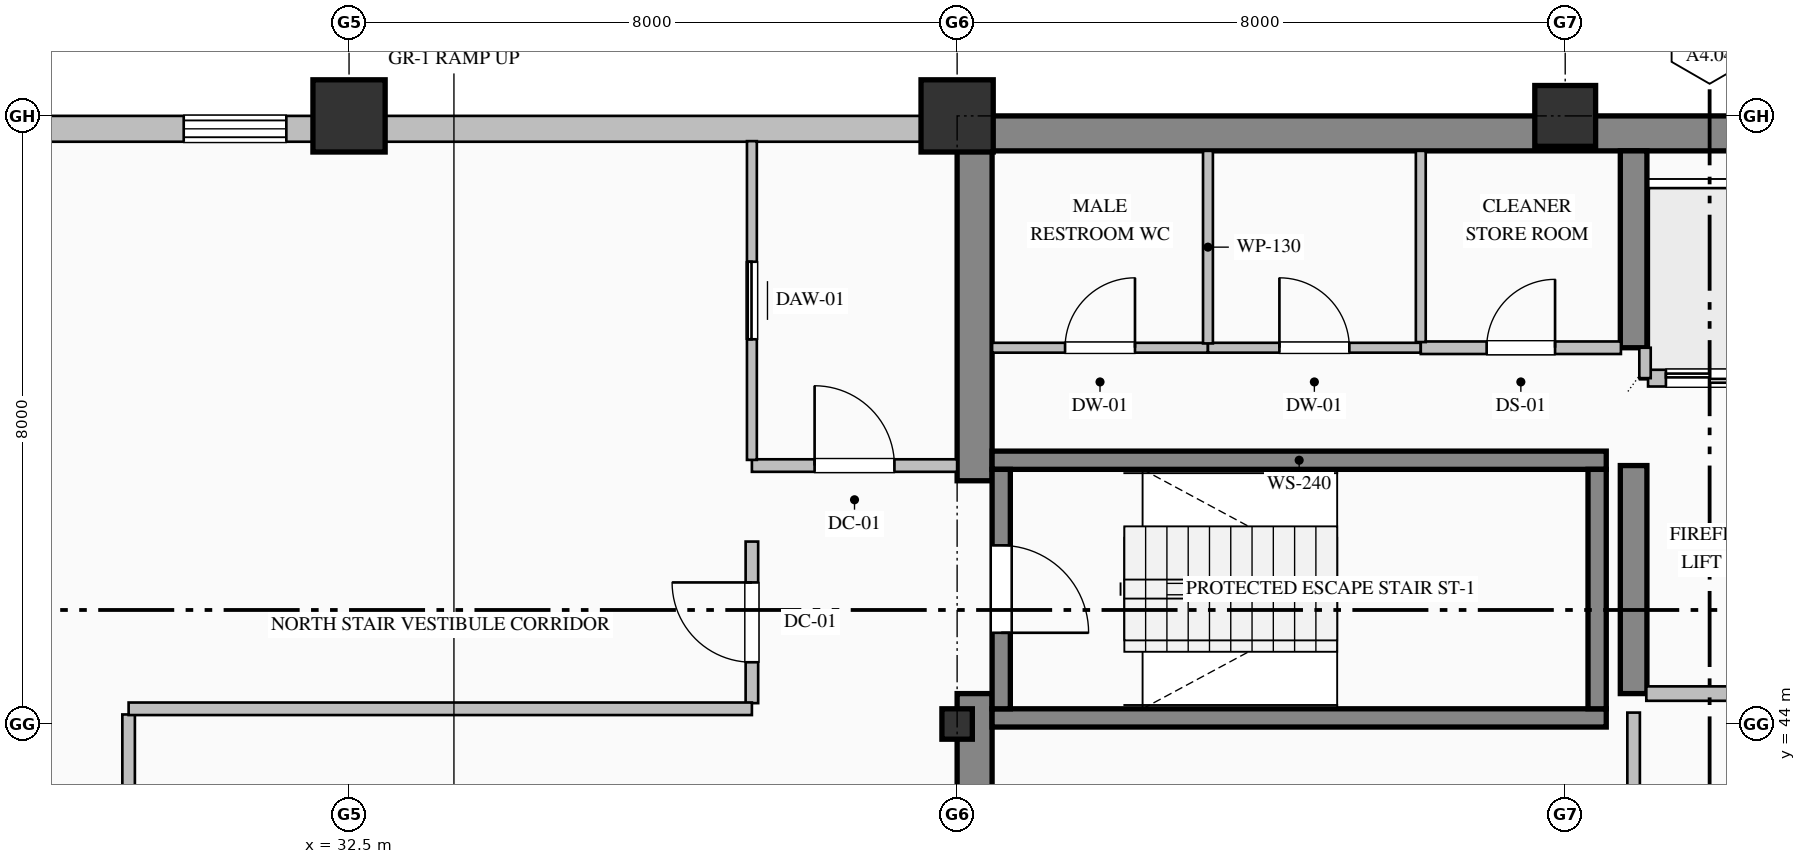
"""IFC4 building model, lengths in metres.
Left out: names, types, materials, properties, quantities, classifications, styles, units other than length and angle.
Written with IfcOpenShell. Run it as: python <this file> out.ifc"""

import sys

from ifc_helpers import new_model, si_unit, direction, frame, frame_2d, origin, origin_2d, place, context, subcontext, project, spatial, rectangle, hollow_rectangle, i_section, extrude, element, fill, save


model = new_model("IFC4")
c1 = context("Model", 3, precision=1e-05, world=origin(), true_north=direction((0.0, 1.0)))
c2 = subcontext(c1, "Body", "Model", "MODEL_VIEW")
j1 = project(units=[si_unit("LENGTHUNIT", "METRE"), si_unit("PLANEANGLEUNIT", "RADIAN")], contexts=[c1])
p1 = place(None, origin())
s1 = spatial("IfcSite", under=j1, at=p1, CompositionType="ELEMENT")
p2 = place(p1, origin())
s2 = spatial("IfcBuilding", under=s1, at=p2, CompositionType="ELEMENT")
p3 = place(p2, frame((0.0, 0.0, 205.8)))
s3 = spatial("IfcBuildingStorey", under=s2, at=p3, CompositionType="ELEMENT", Elevation=205.8)
p4 = place(p3, frame((40.5, 51.77, 0.0), z_axis=(0.0, 0.0, 1.0), x_axis=(1.0, 0.0, 0.0)))
e1 = element("IfcWall", 1, at=p4, inside=s3, PredefinedType="SHEAR", context=c2, shape_type="SweptSolid", body=[
    extrude(rectangle(XDim=23.5, YDim=0.46, at=frame_2d((11.75, 0.0))), origin(), (0.0, 0.0, 1.0), 3.775),
])
p5 = place(p3, frame((40.73, 36.46, 0.0), z_axis=(0.0, 0.0, 1.0), x_axis=(0.0, 1.0, 0.0)))
e2 = element("IfcWall", 2, at=p5, inside=s3, PredefinedType="SHEAR", context=c2, shape_type="SweptSolid", body=[
    extrude(rectangle(XDim=7.94, YDim=0.46, at=frame_2d((3.97, 0.0))), origin(), (0.0, 0.0, 1.0), 3.775),
])
p6 = place(p3, frame((40.73, 47.2, 0.0), z_axis=(0.0, 0.0, 1.0), x_axis=(0.0, 1.0, 0.0)))
e3 = element("IfcWall", 3, at=p6, inside=s3, PredefinedType="SHEAR", context=c2, shape_type="SweptSolid", body=[
    extrude(rectangle(XDim=4.34, YDim=0.46, at=frame_2d((2.17, 0.0))), origin(), (0.0, 0.0, 1.0), 3.775),
])
p7 = place(p3, frame((49.4, 44.4, 0.0), z_axis=(0.0, 0.0, 1.0), x_axis=(0.0, 1.0, 0.0)))
e4 = element("IfcWall", 4, at=p7, inside=s3, PredefinedType="SHEAR", context=c2, shape_type="SweptSolid", body=[
    extrude(rectangle(XDim=3.0, YDim=0.35, at=frame_2d((1.5, 0.0))), origin(), (0.0, 0.0, 1.0), 3.775),
])
p8 = place(p3, frame((49.4, 48.95, 0.0), z_axis=(0.0, 0.0, 1.0), x_axis=(0.0, 1.0, 0.0)))
e5 = element("IfcWall", 5, at=p8, inside=s3, PredefinedType="SHEAR", context=c2, shape_type="SweptSolid", body=[
    extrude(rectangle(XDim=2.59, YDim=0.35, at=frame_2d((1.295, 0.0))), origin(), (0.0, 0.0, 1.0), 3.775),
])
p9 = place(p3, frame((32.5, 52.0, 0.0), z_axis=(0.0, 0.0, 1.0), x_axis=(1.0, 0.0, 0.0)))
e6 = element("IfcColumn", 6, at=p9, inside=s3, PredefinedType="COLUMN", context=c2, shape_type="SweptSolid", body=[
    extrude(hollow_rectangle(XDim=0.95, YDim=0.95, WallThickness=0.036, at=origin_2d()), origin(), (0.0, 0.0, 1.0), 4.0),
])
p10 = place(p3, frame((40.5, 44.0, 0.0), z_axis=(0.0, 0.0, 1.0), x_axis=(1.0, 0.0, 0.0)))
e7 = element("IfcColumn", 7, at=p10, inside=s3, PredefinedType="COLUMN", context=c2, shape_type="SweptSolid", body=[
    extrude(i_section(OverallWidth=0.4, OverallDepth=0.4, WebThickness=0.013, FlangeThickness=0.021, FilletRadius=0.022, at=origin_2d()), origin(), (0.0, 0.0, 1.0), 4.0),
])
p11 = place(p3, frame((40.5, 52.0, 0.0), z_axis=(0.0, 0.0, 1.0), x_axis=(1.0, 0.0, 0.0)))
e8 = element("IfcColumn", 8, at=p11, inside=s3, PredefinedType="COLUMN", context=c2, shape_type="SweptSolid", body=[
    extrude(hollow_rectangle(XDim=0.95, YDim=0.95, WallThickness=0.036, at=origin_2d()), origin(), (0.0, 0.0, 1.0), 4.0),
])
p12 = place(p3, frame((48.5, 52.0, 0.0), z_axis=(0.0, 0.0, 1.0), x_axis=(1.0, 0.0, 0.0)))
e9 = element("IfcColumn", 9, at=p12, inside=s3, PredefinedType="COLUMN", context=c2, shape_type="SweptSolid", body=[
    extrude(hollow_rectangle(XDim=0.8, YDim=0.8, WallThickness=0.032, at=origin_2d()), origin(), (0.0, 0.0, 1.0), 4.0),
])
p13 = place(p3, frame((13.0, 51.83, 0.0), z_axis=(0.0, 0.0, 1.0), x_axis=(1.0, 0.0, 0.0)))
e10 = element("IfcWall", 10, at=p13, inside=s3, PredefinedType="SOLIDWALL", context=c2, shape_type="SweptSolid", body=[
    extrude(rectangle(XDim=27.52, YDim=0.34, at=frame_2d((13.76, 0.0))), origin(), (0.0, 0.0, 1.0), 3.325),
])
p14 = place(p13, frame((17.325, 0.0, 0.9)))
e11 = element("IfcOpeningElement", 11, at=p14, cuts=e10, PredefinedType="OPENING", context=c2, shape_type="SweptSolid", body=[
    extrude(rectangle(XDim=1.35, YDim=1.85, at=frame_2d((0.675, 0.925))), frame((0.0, 0.18, 0.0), z_axis=(0.0, -1.0, 0.0), x_axis=(1.0, 0.0, 0.0)), (0.0, 0.0, 1.0), 0.36),
])
for number, where, z_axis, x_axis in (
    (12, (40.96, 47.47, 0.0), (0.0, 0.0, 1.0), (1.0, 0.0, 0.0)),
    (13, (49.04, 44.08, 0.0), (0.0, 0.0, 1.0), (-1.0, 0.0, 0.0)),
):
    element("IfcWall", number, at=place(p3, frame(where, z_axis=z_axis, x_axis=x_axis)), inside=s3, PredefinedType="SOLIDWALL", context=c2, shape_type="SweptSolid", body=[
        extrude(rectangle(XDim=8.08, YDim=0.24, at=frame_2d((4.04, 0.0))), origin(), (0.0, 0.0, 1.0), 4.0),
    ])
p15 = place(p3, frame((41.08, 47.35, 0.0), z_axis=(0.0, 0.0, 1.0), x_axis=(0.0, -1.0, 0.0)))
e14 = element("IfcWall", 14, at=p15, inside=s3, PredefinedType="SOLIDWALL", context=c2, shape_type="SweptSolid", body=[
    extrude(rectangle(XDim=3.15, YDim=0.24, at=frame_2d((1.575, 0.0))), origin(), (0.0, 0.0, 1.0), 4.0),
])
p16 = place(p15, frame((1.0, 0.0, 0.0)))
e15 = element("IfcOpeningElement", 15, at=p16, cuts=e14, PredefinedType="OPENING", context=c2, shape_type="SweptSolid", body=[
    extrude(rectangle(XDim=1.15, YDim=2.2, at=frame_2d((0.575, 1.1))), frame((0.0, 0.13, 0.0), z_axis=(0.0, -1.0, 0.0), x_axis=(1.0, 0.0, 0.0)), (0.0, 0.0, 1.0), 0.26),
])
p17 = place(p3, frame((48.92, 44.2, 0.0), z_axis=(0.0, 0.0, 1.0), x_axis=(0.0, 1.0, 0.0)))
e16 = element("IfcWall", 16, at=p17, inside=s3, PredefinedType="SOLIDWALL", context=c2, shape_type="SweptSolid", body=[
    extrude(rectangle(XDim=3.15, YDim=0.24, at=frame_2d((1.575, 0.0))), origin(), (0.0, 0.0, 1.0), 4.0),
])
p18 = place(p3, frame((54.71, 48.55, 0.0), z_axis=(0.0, 0.0, 1.0), x_axis=(-1.0, 0.0, 0.0)))
e17 = element("IfcWall", 17, at=p18, inside=s3, PredefinedType="PARTITIONING", context=c2, shape_type="SweptSolid", body=[
    extrude(rectangle(XDim=5.12, YDim=0.22, at=frame_2d((2.56, 0.0))), origin(), (0.0, 0.0, 1.0), 3.775),
])
p19 = place(p18, frame((3.735, 0.0, 0.0)))
e18 = element("IfcOpeningElement", 18, at=p19, cuts=e17, PredefinedType="OPENING", context=c2, shape_type="SweptSolid", body=[
    extrude(rectangle(XDim=1.15, YDim=2.2, at=frame_2d((0.575, 1.1))), frame((0.0, 0.12, 0.0), z_axis=(0.0, -1.0, 0.0), x_axis=(1.0, 0.0, 0.0)), (0.0, 0.0, 1.0), 0.24),
])
p20 = place(p18, frame((0.935, 0.0, 0.0)))
e19 = element("IfcOpeningElement", 19, at=p20, cuts=e17, PredefinedType="OPENING", context=c2, shape_type="SweptSolid", body=[
    extrude(rectangle(XDim=1.15, YDim=2.2, at=frame_2d((0.575, 1.1))), frame((0.0, 0.12, 0.0), z_axis=(0.0, -1.0, 0.0), x_axis=(1.0, 0.0, 0.0)), (0.0, 0.0, 1.0), 0.24),
])
p21 = place(p3, frame((49.55, 48.55, 0.0), z_axis=(0.0, 0.0, 1.0), x_axis=(0.0, 1.0, 0.0)))
e20 = element("IfcWall", 20, at=p21, inside=s3, PredefinedType="PARTITIONING", context=c2, shape_type="SweptSolid", body=[
    extrude(rectangle(XDim=0.4, YDim=0.15, at=frame_2d((0.2, 0.0))), origin(), (0.0, 0.0, 1.0), 3.775),
])
p22 = place(p3, frame((37.8, 47.4, 0.0), z_axis=(0.0, 0.0, 1.0), x_axis=(1.0, 0.0, 0.0)))
e21 = element("IfcWall", 21, at=p22, inside=s3, PredefinedType="PARTITIONING", context=c2, shape_type="SweptSolid", body=[
    extrude(rectangle(XDim=2.7, YDim=0.165, at=frame_2d((1.35, 0.0))), origin(), (0.0, 0.0, 1.0), 3.775),
])
p23 = place(p22, frame((0.825, 0.0, 0.0)))
e22 = element("IfcOpeningElement", 22, at=p23, cuts=e21, PredefinedType="OPENING", context=c2, shape_type="SweptSolid", body=[
    extrude(rectangle(XDim=1.05, YDim=2.15, at=frame_2d((0.525, 1.075))), frame((0.0, 0.093, 0.0), z_axis=(0.0, -1.0, 0.0), x_axis=(1.0, 0.0, 0.0)), (0.0, 0.0, 1.0), 0.185),
])
p24 = place(p3, frame((37.8, 44.274, 0.0), z_axis=(0.0, 0.0, 1.0), x_axis=(0.0, 1.0, 0.0)))
e23 = element("IfcWall", 23, at=p24, inside=s3, PredefinedType="PARTITIONING", context=c2, shape_type="SweptSolid", body=[
    extrude(rectangle(XDim=2.125, YDim=0.165, at=frame_2d((1.063, 0.0))), origin(), (0.0, 0.0, 1.0), 3.775),
])
p25 = place(p24, frame((0.538, 0.0, 0.0)))
e24 = element("IfcOpeningElement", 24, at=p25, cuts=e23, PredefinedType="OPENING", context=c2, shape_type="SweptSolid", body=[
    extrude(rectangle(XDim=1.05, YDim=2.15, at=frame_2d((0.525, 1.075))), frame((0.0, 0.093, 0.0), z_axis=(0.0, -1.0, 0.0), x_axis=(1.0, 0.0, 0.0)), (0.0, 0.0, 1.0), 0.185),
])
p26 = place(p3, frame((37.8, 47.475, 0.0), z_axis=(0.0, 0.0, 1.0), x_axis=(0.0, 1.0, 0.0)))
e25 = element("IfcWall", 25, at=p26, inside=s3, PredefinedType="PARTITIONING", context=c2, shape_type="SweptSolid", body=[
    extrude(rectangle(XDim=4.193, YDim=0.13, at=frame_2d((2.097, 0.0))), origin(), (0.0, 0.0, 1.0), 3.775),
])
p27 = place(p26, frame((1.587, 0.0, 0.0)))
e26 = element("IfcOpeningElement", 26, at=p27, cuts=e25, PredefinedType="OPENING", context=c2, shape_type="SweptSolid", body=[
    extrude(rectangle(XDim=1.02, YDim=2.15, at=frame_2d((0.51, 1.075))), frame((0.0, 0.075, 0.0), z_axis=(0.0, -1.0, 0.0), x_axis=(1.0, 0.0, 0.0)), (0.0, 0.0, 1.0), 0.15),
])
p28 = place(p3, frame((40.96, 48.95, 0.0), z_axis=(0.0, 0.0, 1.0), x_axis=(1.0, 0.0, 0.0)))
e27 = element("IfcWall", 27, at=p28, inside=s3, PredefinedType="PARTITIONING", context=c2, shape_type="SweptSolid", body=[
    extrude(rectangle(XDim=2.84, YDim=0.13, at=frame_2d((1.42, 0.0))), origin(), (0.0, 0.0, 1.0), 3.775),
])
p29 = place(p28, frame((0.96, 0.0, 0.0)))
e28 = element("IfcOpeningElement", 28, at=p29, cuts=e27, PredefinedType="OPENING", context=c2, shape_type="SweptSolid", body=[
    extrude(rectangle(XDim=0.92, YDim=2.15, at=frame_2d((0.46, 1.075))), frame((0.0, 0.075, 0.0), z_axis=(0.0, -1.0, 0.0), x_axis=(1.0, 0.0, 0.0)), (0.0, 0.0, 1.0), 0.15),
])
p30 = place(p3, frame((43.8, 48.95, 0.0), z_axis=(0.0, 0.0, 1.0), x_axis=(1.0, 0.0, 0.0)))
e29 = element("IfcWall", 29, at=p30, inside=s3, PredefinedType="PARTITIONING", context=c2, shape_type="SweptSolid", body=[
    extrude(rectangle(XDim=2.8, YDim=0.13, at=frame_2d((1.4, 0.0))), origin(), (0.0, 0.0, 1.0), 3.775),
])
p31 = place(p30, frame((0.94, 0.0, 0.0)))
e30 = element("IfcOpeningElement", 30, at=p31, cuts=e29, PredefinedType="OPENING", context=c2, shape_type="SweptSolid", body=[
    extrude(rectangle(XDim=0.92, YDim=2.15, at=frame_2d((0.46, 1.075))), frame((0.0, 0.075, 0.0), z_axis=(0.0, -1.0, 0.0), x_axis=(1.0, 0.0, 0.0)), (0.0, 0.0, 1.0), 0.15),
])
p32 = place(p3, frame((46.6, 48.95, 0.0), z_axis=(0.0, 0.0, 1.0), x_axis=(1.0, 0.0, 0.0)))
e31 = element("IfcWall", 31, at=p32, inside=s3, PredefinedType="PARTITIONING", context=c2, shape_type="SweptSolid", body=[
    extrude(rectangle(XDim=2.633, YDim=0.165, at=frame_2d((1.316, 0.0))), origin(), (0.0, 0.0, 1.0), 3.775),
])
p33 = place(p32, frame((0.866, 0.0, 0.0)))
e32 = element("IfcOpeningElement", 32, at=p33, cuts=e31, PredefinedType="OPENING", context=c2, shape_type="SweptSolid", body=[
    extrude(rectangle(XDim=0.9, YDim=2.15, at=frame_2d((0.45, 1.075))), frame((0.0, 0.093, 0.0), z_axis=(0.0, -1.0, 0.0), x_axis=(1.0, 0.0, 0.0)), (0.0, 0.0, 1.0), 0.185),
])
p34 = place(p3, frame((54.733, 44.4, 0.0), z_axis=(0.0, 0.0, 1.0), x_axis=(-1.0, 0.0, 0.0)))
e33 = element("IfcWall", 33, at=p34, inside=s3, PredefinedType="PARTITIONING", context=c2, shape_type="SweptSolid", body=[
    extrude(rectangle(XDim=5.166, YDim=0.19, at=frame_2d((2.583, 0.0))), origin(), (0.0, 0.0, 1.0), 3.775),
])
p35 = place(p34, frame((2.058, 0.0, 0.0)))
e34 = element("IfcOpeningElement", 34, at=p35, cuts=e33, PredefinedType="OPENING", context=c2, shape_type="SweptSolid", body=[
    extrude(rectangle(XDim=1.05, YDim=2.15, at=frame_2d((0.525, 1.075))), frame((0.0, 0.105, 0.0), z_axis=(0.0, -1.0, 0.0), x_axis=(1.0, 0.0, 0.0)), (0.0, 0.0, 1.0), 0.21),
])
p36 = place(p3, frame((49.4, 36.46, 0.0), z_axis=(0.0, 0.0, 1.0), x_axis=(0.0, 1.0, 0.0)))
e35 = element("IfcWall", 35, at=p36, inside=s3, PredefinedType="PARTITIONING", context=c2, shape_type="SweptSolid", body=[
    extrude(rectangle(XDim=7.69, YDim=0.165, at=frame_2d((3.845, 0.0))), origin(), (0.0, 0.0, 1.0), 3.017),
])
p37 = place(p36, frame((3.345, 0.0, 0.0)))
e36 = element("IfcOpeningElement", 36, at=p37, cuts=e35, PredefinedType="OPENING", context=c2, shape_type="SweptSolid", body=[
    extrude(rectangle(XDim=1.0, YDim=2.15, at=frame_2d((0.5, 1.075))), frame((0.0, 0.093, 0.0), z_axis=(0.0, -1.0, 0.0), x_axis=(1.0, 0.0, 0.0)), (0.0, 0.0, 1.0), 0.185),
])
p38 = place(p3, frame((43.8, 51.54, 0.0), z_axis=(0.0, 0.0, 1.0), x_axis=(0.0, -1.0, 0.0)))
e37 = element("IfcWall", 37, at=p38, inside=s3, PredefinedType="PARTITIONING", context=c2, shape_type="SweptSolid", body=[
    extrude(rectangle(XDim=2.533, YDim=0.13, at=frame_2d((1.267, 0.0))), origin(), (0.0, 0.0, 1.0), 3.775),
])
p39 = place(p3, frame((46.6, 51.54, 0.0), z_axis=(0.0, 0.0, 1.0), x_axis=(0.0, -1.0, 0.0)))
e38 = element("IfcWall", 38, at=p39, inside=s3, PredefinedType="PARTITIONING", context=c2, shape_type="SweptSolid", body=[
    extrude(rectangle(XDim=2.516, YDim=0.13, at=frame_2d((1.258, 0.0))), origin(), (0.0, 0.0, 1.0), 3.775),
])
p40 = place(p3, frame((29.6, 44.125, 0.0), z_axis=(0.0, 0.0, 1.0), x_axis=(0.0, -1.0, 0.0)))
e39 = element("IfcWall", 39, at=p40, inside=s3, PredefinedType="PARTITIONING", context=c2, shape_type="SweptSolid", body=[
    extrude(rectangle(XDim=11.451, YDim=0.165, at=frame_2d((5.726, 0.0))), origin(), (0.0, 0.0, 1.0), 3.775),
])
p41 = place(p40, frame((5.226, 0.0, 0.0)))
e40 = element("IfcOpeningElement", 40, at=p41, cuts=e39, PredefinedType="OPENING", context=c2, shape_type="SweptSolid", body=[
    extrude(rectangle(XDim=1.0, YDim=2.15, at=frame_2d((0.5, 1.075))), frame((0.0, 0.093, 0.0), z_axis=(0.0, -1.0, 0.0), x_axis=(1.0, 0.0, 0.0)), (0.0, 0.0, 1.0), 0.185),
])
p42 = place(p3, frame((37.8, 44.2, 0.0), z_axis=(0.0, 0.0, 1.0), x_axis=(-1.0, 0.0, 0.0)))
e41 = element("IfcWall", 41, at=p42, inside=s3, PredefinedType="PARTITIONING", context=c2, shape_type="SweptSolid", body=[
    extrude(rectangle(XDim=8.2, YDim=0.165, at=frame_2d((4.1, 0.0))), origin(), (0.0, 0.0, 1.0), 3.775),
])
p43 = place(p14, origin())
e42 = element("IfcWindow", 42, at=p43, inside=s3, PartitioningType="DOUBLE_PANEL_VERTICAL", PredefinedType="WINDOW", context=c2, shape_type="SweptSolid", body=[
    extrude(rectangle(XDim=1.35, YDim=1.85, at=frame_2d((0.675, 0.925))), frame((0.0, 0.15, 0.0), z_axis=(0.0, -1.0, 0.0), x_axis=(1.0, 0.0, 0.0)), (0.0, 0.0, 1.0), 0.06),
])
fill(e11, e42)
p44 = place(p16, origin())
e43 = element("IfcDoor", 43, at=p44, inside=s3, OperationType="SINGLE_SWING_RIGHT", PredefinedType="DOOR", context=c2, shape_type="SweptSolid", body=[
    extrude(rectangle(XDim=1.15, YDim=2.2, at=frame_2d((0.575, 1.1))), frame((0.0, 0.025, 0.0), z_axis=(0.0, -1.0, 0.0), x_axis=(1.0, 0.0, 0.0)), (0.0, 0.0, 1.0), 0.05),
])
fill(e15, e43)
p45 = place(p19, origin())
e44 = element("IfcDoor", 44, at=p45, inside=s3, OperationType="DOUBLE_DOOR_SLIDING", PredefinedType="DOOR", context=c2, shape_type="SweptSolid", body=[
    extrude(rectangle(XDim=1.15, YDim=2.2, at=frame_2d((0.575, 1.1))), frame((0.0, 0.025, 0.0), z_axis=(0.0, -1.0, 0.0), x_axis=(1.0, 0.0, 0.0)), (0.0, 0.0, 1.0), 0.05),
])
fill(e18, e44)
p46 = place(p23, origin())
e45 = element("IfcDoor", 45, at=p46, inside=s3, OperationType="SINGLE_SWING_LEFT", PredefinedType="DOOR", context=c2, shape_type="SweptSolid", body=[
    extrude(rectangle(XDim=1.05, YDim=2.15, at=frame_2d((0.525, 1.075))), frame((0.0, 0.025, 0.0), z_axis=(0.0, -1.0, 0.0), x_axis=(1.0, 0.0, 0.0)), (0.0, 0.0, 1.0), 0.05),
])
fill(e22, e45)
p47 = place(p25, origin())
e46 = element("IfcDoor", 46, at=p47, inside=s3, OperationType="SINGLE_SWING_RIGHT", PredefinedType="DOOR", context=c2, shape_type="SweptSolid", body=[
    extrude(rectangle(XDim=1.05, YDim=2.15, at=frame_2d((0.525, 1.075))), frame((0.0, 0.025, 0.0), z_axis=(0.0, -1.0, 0.0), x_axis=(1.0, 0.0, 0.0)), (0.0, 0.0, 1.0), 0.05),
])
fill(e24, e46)
p48 = place(p27, origin())
e47 = element("IfcDoor", 47, at=p48, inside=s3, OperationType="SLIDING_TO_LEFT", PredefinedType="DOOR", context=c2, shape_type="SweptSolid", body=[
    extrude(rectangle(XDim=1.02, YDim=2.15, at=frame_2d((0.51, 1.075))), frame((0.0, 0.025, 0.0), z_axis=(0.0, -1.0, 0.0), x_axis=(1.0, 0.0, 0.0)), (0.0, 0.0, 1.0), 0.05),
])
fill(e26, e47)
p49 = place(p29, origin())
e48 = element("IfcDoor", 48, at=p49, inside=s3, OperationType="SINGLE_SWING_RIGHT", PredefinedType="DOOR", context=c2, shape_type="SweptSolid", body=[
    extrude(rectangle(XDim=0.92, YDim=2.15, at=frame_2d((0.46, 1.075))), frame((0.0, 0.025, 0.0), z_axis=(0.0, -1.0, 0.0), x_axis=(1.0, 0.0, 0.0)), (0.0, 0.0, 1.0), 0.05),
])
fill(e28, e48)
p50 = place(p31, origin())
e49 = element("IfcDoor", 49, at=p50, inside=s3, OperationType="SINGLE_SWING_LEFT", PredefinedType="DOOR", context=c2, shape_type="SweptSolid", body=[
    extrude(rectangle(XDim=0.92, YDim=2.15, at=frame_2d((0.46, 1.075))), frame((0.0, 0.025, 0.0), z_axis=(0.0, -1.0, 0.0), x_axis=(1.0, 0.0, 0.0)), (0.0, 0.0, 1.0), 0.05),
])
fill(e30, e49)
p51 = place(p33, origin())
e50 = element("IfcDoor", 50, at=p51, inside=s3, OperationType="SINGLE_SWING_RIGHT", PredefinedType="DOOR", context=c2, shape_type="SweptSolid", body=[
    extrude(rectangle(XDim=0.9, YDim=2.15, at=frame_2d((0.45, 1.075))), frame((0.0, 0.025, 0.0), z_axis=(0.0, -1.0, 0.0), x_axis=(1.0, 0.0, 0.0)), (0.0, 0.0, 1.0), 0.05),
])
fill(e32, e50)
save(model, sys.argv[1])
